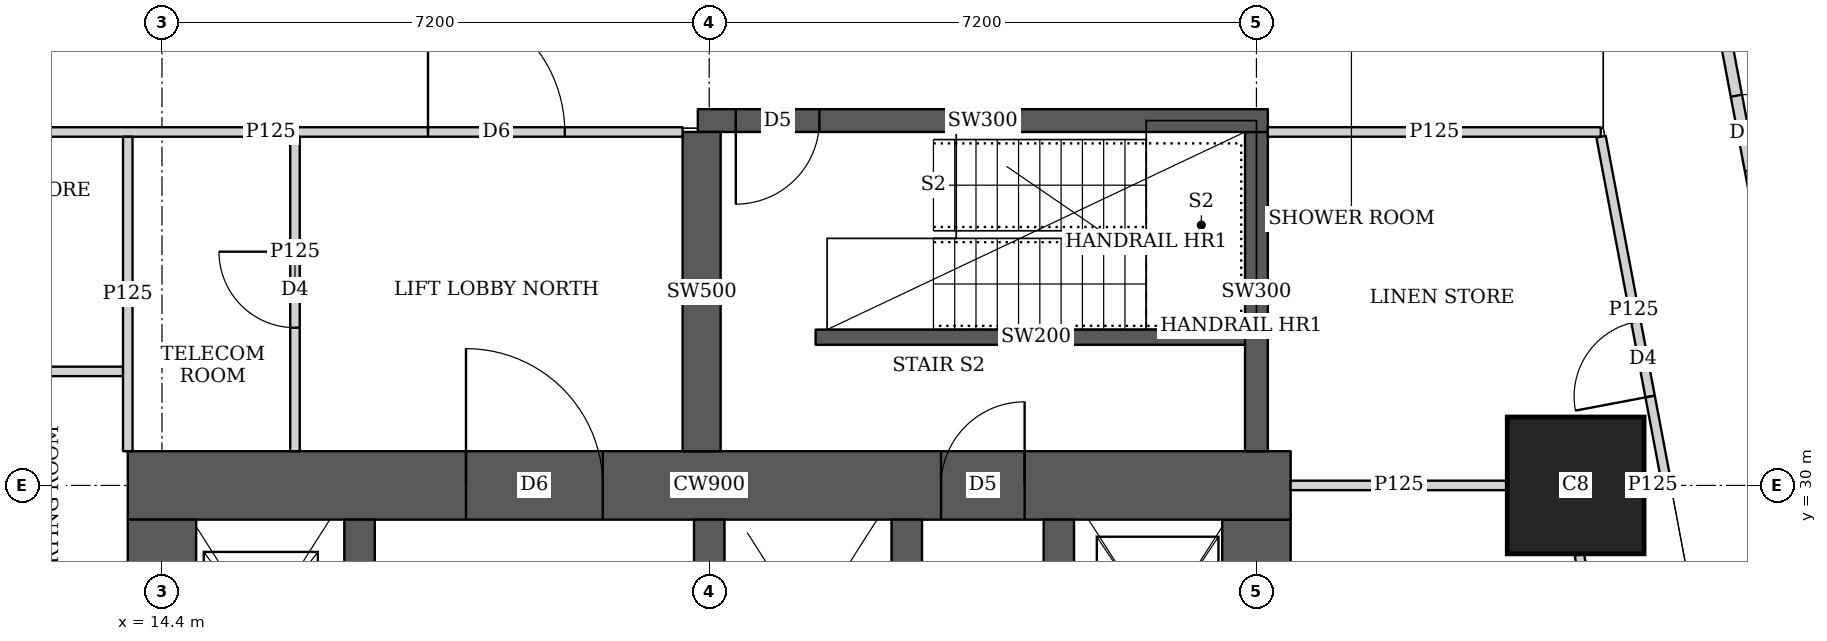
"""IFC4 building model, lengths in metres.
Left out: names, types, materials, properties, quantities, classifications, styles, units other than length and angle.
Written with IfcOpenShell. Run it as: python <this file> out.ifc"""

import sys

from ifc_helpers import new_model, si_unit, direction, frame, frame_2d, origin, origin_2d, place, context, subcontext, project, spatial, rectangle, extrude, element, fill, save


model = new_model("IFC4")
c1 = context("Model", 3, precision=1e-05, world=origin(), true_north=direction((0.0, 1.0)))
c2 = subcontext(c1, "Body", "Model", "MODEL_VIEW")
j1 = project(units=[si_unit("LENGTHUNIT", "METRE"), si_unit("PLANEANGLEUNIT", "RADIAN")], contexts=[c1])
p1 = place(None, origin())
s1 = spatial("IfcSite", under=j1, at=p1, CompositionType="ELEMENT")
p2 = place(p1, origin())
s2 = spatial("IfcBuilding", under=s1, at=p2, CompositionType="ELEMENT")
p3 = place(p2, frame((0.0, 0.0, 20.0)))
s3 = spatial("IfcBuildingStorey", under=s2, at=p3, CompositionType="ELEMENT", Elevation=20.0)
p4 = place(p3, frame((33.0, 30.0, 0.0), z_axis=(0.0, 0.0, 1.0), x_axis=(1.0, 0.0, 0.0)))
e1 = element("IfcColumn", 1, at=p4, inside=s3, PredefinedType="COLUMN", context=c2, shape_type="SweptSolid", body=[
    extrude(rectangle(XDim=1.8, YDim=1.8, at=origin_2d()), origin(), (0.0, 0.0, 1.0), 3.75),
])
p5 = place(p3, frame((13.95, 30.0, 0.0), z_axis=(0.0, 0.0, 1.0), x_axis=(1.0, 0.0, 0.0)))
e2 = element("IfcWall", 2, at=p5, inside=s3, PredefinedType="SHEAR", context=c2, shape_type="SweptSolid", body=[
    extrude(rectangle(XDim=15.3, YDim=0.9, at=frame_2d((7.65, 0.0))), origin(), (0.0, 0.0, 1.0), 3.75),
])
p6 = place(p5, frame((4.45, 0.0, 0.0)))
e3 = element("IfcOpeningElement", 3, at=p6, cuts=e2, PredefinedType="OPENING", context=c2, shape_type="SweptSolid", body=[
    extrude(rectangle(XDim=1.8, YDim=2.1, at=frame_2d((0.9, 1.05))), frame((0.0, 0.46, 0.0), z_axis=(0.0, -1.0, 0.0), x_axis=(1.0, 0.0, 0.0)), (0.0, 0.0, 1.0), 0.92),
])
p7 = place(p5, frame((10.7, 0.0, 0.0)))
e4 = element("IfcOpeningElement", 4, at=p7, cuts=e2, PredefinedType="OPENING", context=c2, shape_type="SweptSolid", body=[
    extrude(rectangle(XDim=1.1, YDim=2.1, at=frame_2d((0.55, 1.05))), frame((0.0, 0.46, 0.0), z_axis=(0.0, -1.0, 0.0), x_axis=(1.0, 0.0, 0.0)), (0.0, 0.0, 1.0), 0.92),
])
for number, where, z_axis, x_axis in (
    (5, (14.4, 15.45, 0.0), (0.0, 0.0, 1.0), (0.0, 1.0, 0.0)),
    (6, (28.8, 15.45, 0.0), (0.0, 0.0, 1.0), (0.0, 1.0, 0.0)),
):
    element("IfcWall", number, at=place(p3, frame(where, z_axis=z_axis, x_axis=x_axis)), inside=s3, PredefinedType="SHEAR", context=c2, shape_type="SweptSolid", body=[
        extrude(rectangle(XDim=14.1, YDim=0.9, at=frame_2d((7.05, 0.0))), origin(), (0.0, 0.0, 1.0), 3.75),
    ])
p8 = place(p3, frame((17.0, 15.45, 0.0), z_axis=(0.0, 0.0, 1.0), x_axis=(0.0, 1.0, 0.0)))
e7 = element("IfcWall", 7, at=p8, inside=s3, PredefinedType="SHEAR", context=c2, shape_type="SweptSolid", body=[
    extrude(rectangle(XDim=14.1, YDim=0.4, at=frame_2d((7.05, 0.0))), origin(), (0.0, 0.0, 1.0), 3.75),
])
p9 = place(p8, frame((0.875, 0.0, 0.0)))
e8 = element("IfcOpeningElement", 8, at=p9, cuts=e7, PredefinedType="OPENING", context=c2, shape_type="SweptSolid", body=[
    extrude(rectangle(XDim=1.1, YDim=2.1, at=frame_2d((0.55, 1.05))), frame((0.0, 0.21, 0.0), z_axis=(0.0, -1.0, 0.0), x_axis=(1.0, 0.0, 0.0)), (0.0, 0.0, 1.0), 0.42),
])
p10 = place(p8, frame((4.625, 0.0, 0.0)))
e9 = element("IfcOpeningElement", 9, at=p10, cuts=e7, PredefinedType="OPENING", context=c2, shape_type="SweptSolid", body=[
    extrude(rectangle(XDim=1.1, YDim=2.1, at=frame_2d((0.55, 1.05))), frame((0.0, 0.21, 0.0), z_axis=(0.0, -1.0, 0.0), x_axis=(1.0, 0.0, 0.0)), (0.0, 0.0, 1.0), 0.42),
])
p11 = place(p8, frame((8.375, 0.0, 0.0)))
e10 = element("IfcOpeningElement", 10, at=p11, cuts=e7, PredefinedType="OPENING", context=c2, shape_type="SweptSolid", body=[
    extrude(rectangle(XDim=1.1, YDim=2.1, at=frame_2d((0.55, 1.05))), frame((0.0, 0.21, 0.0), z_axis=(0.0, -1.0, 0.0), x_axis=(1.0, 0.0, 0.0)), (0.0, 0.0, 1.0), 0.42),
])
p12 = place(p8, frame((12.125, 0.0, 0.0)))
e11 = element("IfcOpeningElement", 11, at=p12, cuts=e7, PredefinedType="OPENING", context=c2, shape_type="SweptSolid", body=[
    extrude(rectangle(XDim=1.1, YDim=2.1, at=frame_2d((0.55, 1.05))), frame((0.0, 0.21, 0.0), z_axis=(0.0, -1.0, 0.0), x_axis=(1.0, 0.0, 0.0)), (0.0, 0.0, 1.0), 0.42),
])
for number, where, z_axis, x_axis in (
    (12, (21.6, 15.45, 0.0), (0.0, 0.0, 1.0), (0.0, 1.0, 0.0)),
    (13, (24.2, 15.45, 0.0), (0.0, 0.0, 1.0), (0.0, 1.0, 0.0)),
):
    element("IfcWall", number, at=place(p3, frame(where, z_axis=z_axis, x_axis=x_axis)), inside=s3, PredefinedType="SHEAR", context=c2, shape_type="SweptSolid", body=[
        extrude(rectangle(XDim=14.1, YDim=0.4, at=frame_2d((7.05, 0.0))), origin(), (0.0, 0.0, 1.0), 3.75),
    ])
p13 = place(p3, frame((26.2, 26.45, 0.0), z_axis=(0.0, 0.0, 1.0), x_axis=(0.0, 1.0, 0.0)))
e14 = element("IfcWall", 14, at=p13, inside=s3, PredefinedType="SHEAR", context=c2, shape_type="SweptSolid", body=[
    extrude(rectangle(XDim=3.1, YDim=0.4, at=frame_2d((1.55, 0.0))), origin(), (0.0, 0.0, 1.0), 3.75),
])
p14 = place(p13, frame((1.075, 0.0, 0.0)))
e15 = element("IfcOpeningElement", 15, at=p14, cuts=e14, PredefinedType="OPENING", context=c2, shape_type="SweptSolid", body=[
    extrude(rectangle(XDim=1.2, YDim=2.1, at=frame_2d((0.6, 1.05))), frame((0.0, 0.21, 0.0), z_axis=(0.0, -1.0, 0.0), x_axis=(1.0, 0.0, 0.0)), (0.0, 0.0, 1.0), 0.42),
])
p15 = place(p3, frame((21.45, 34.8, 0.0), z_axis=(0.0, 0.0, 1.0), x_axis=(1.0, 0.0, 0.0)))
e16 = element("IfcWall", 16, at=p15, inside=s3, PredefinedType="SHEAR", context=c2, shape_type="SweptSolid", body=[
    extrude(rectangle(XDim=7.5, YDim=0.3, at=frame_2d((3.75, 0.0))), origin(), (0.0, 0.0, 1.0), 3.75),
])
p16 = place(p15, frame((0.5, 0.0, 0.0)))
e17 = element("IfcOpeningElement", 17, at=p16, cuts=e16, PredefinedType="OPENING", context=c2, shape_type="SweptSolid", body=[
    extrude(rectangle(XDim=1.1, YDim=2.1, at=frame_2d((0.55, 1.05))), frame((0.0, 0.16, 0.0), z_axis=(0.0, -1.0, 0.0), x_axis=(1.0, 0.0, 0.0)), (0.0, 0.0, 1.0), 0.32),
])
p17 = place(p3, frame((21.5, 30.45, 0.0), z_axis=(0.0, 0.0, 1.0), x_axis=(0.0, 1.0, 0.0)))
e18 = element("IfcWall", 18, at=p17, inside=s3, PredefinedType="SHEAR", context=c2, shape_type="SweptSolid", body=[
    extrude(rectangle(XDim=4.2, YDim=0.5, at=frame_2d((2.1, 0.0))), origin(), (0.0, 0.0, 1.0), 3.75),
])
p18 = place(p3, frame((28.8, 30.45, 0.0), z_axis=(0.0, 0.0, 1.0), x_axis=(0.0, 1.0, 0.0)))
e19 = element("IfcWall", 19, at=p18, inside=s3, PredefinedType="SHEAR", context=c2, shape_type="SweptSolid", body=[
    extrude(rectangle(XDim=4.2, YDim=0.3, at=frame_2d((2.1, 0.0))), origin(), (0.0, 0.0, 1.0), 3.75),
])
p19 = place(p3, frame((33.755, 42.325, 0.0), z_axis=(0.0, 0.0, 1.0), x_axis=(0.185611461091, -0.982623216453, 0.0)))
e20 = element("IfcWall", 20, at=p19, inside=s3, PredefinedType="SOLIDWALL", context=c2, shape_type="SweptSolid", body=[
    extrude(rectangle(XDim=40.241, YDim=0.15, at=frame_2d((20.121, 0.0))), origin(), (0.0, 0.0, 1.0), 2.5),
])
p20 = place(p19, frame((7.325, 0.0, 0.0)))
e21 = element("IfcOpeningElement", 21, at=p20, cuts=e20, PredefinedType="OPENING", context=c2, shape_type="SweptSolid", body=[
    extrude(rectangle(XDim=1.0, YDim=2.1, at=frame_2d((0.5, 1.05))), frame((0.0, 0.085, 0.0), z_axis=(0.0, -1.0, 0.0), x_axis=(1.0, 0.0, 0.0)), (0.0, 0.0, 1.0), 0.17),
])
p21 = place(p19, frame((11.902, 0.0, 0.0)))
e22 = element("IfcOpeningElement", 22, at=p21, cuts=e20, PredefinedType="OPENING", context=c2, shape_type="SweptSolid", body=[
    extrude(rectangle(XDim=1.0, YDim=2.1, at=frame_2d((0.5, 1.05))), frame((0.0, 0.085, 0.0), z_axis=(0.0, -1.0, 0.0), x_axis=(1.0, 0.0, 0.0)), (0.0, 0.0, 1.0), 0.17),
])
p22 = place(p19, frame((25.718, 0.0, 0.0)))
e23 = element("IfcOpeningElement", 23, at=p22, cuts=e20, PredefinedType="OPENING", context=c2, shape_type="SweptSolid", body=[
    extrude(rectangle(XDim=1.0, YDim=2.1, at=frame_2d((0.5, 1.05))), frame((0.0, 0.085, 0.0), z_axis=(0.0, -1.0, 0.0), x_axis=(1.0, 0.0, 0.0)), (0.0, 0.0, 1.0), 0.17),
])
p23 = place(p19, frame((31.788, 0.0, 0.0)))
e24 = element("IfcOpeningElement", 24, at=p23, cuts=e20, PredefinedType="OPENING", context=c2, shape_type="SweptSolid", body=[
    extrude(rectangle(XDim=1.0, YDim=2.1, at=frame_2d((0.5, 1.05))), frame((0.0, 0.085, 0.0), z_axis=(0.0, -1.0, 0.0), x_axis=(1.0, 0.0, 0.0)), (0.0, 0.0, 1.0), 0.17),
])
p24 = place(p3, frame((10.413, 31.5, 0.0), z_axis=(0.0, 0.0, 1.0), x_axis=(1.0, 0.0, 0.0)))
e25 = element("IfcWall", 25, at=p24, inside=s3, PredefinedType="PARTITIONING", context=c2, shape_type="SweptSolid", body=[
    extrude(rectangle(XDim=3.475, YDim=0.125, at=frame_2d((1.737, 0.0))), origin(), (0.0, 0.0, 1.0), 3.5),
])
p25 = place(p3, frame((13.95, 30.45, 0.0), z_axis=(0.0, 0.0, 1.0), x_axis=(0.0, 1.0, 0.0)))
e26 = element("IfcWall", 26, at=p25, inside=s3, PredefinedType="PARTITIONING", context=c2, shape_type="SweptSolid", body=[
    extrude(rectangle(XDim=4.137, YDim=0.125, at=frame_2d((2.068, 0.0))), origin(), (0.0, 0.0, 1.0), 3.5),
])
p26 = place(p3, frame((10.413, 34.65, 0.0), z_axis=(0.0, 0.0, 1.0), x_axis=(1.0, 0.0, 0.0)))
e27 = element("IfcWall", 27, at=p26, inside=s3, PredefinedType="PARTITIONING", context=c2, shape_type="SweptSolid", body=[
    extrude(rectangle(XDim=10.837, YDim=0.125, at=frame_2d((5.418, 0.0))), origin(), (0.0, 0.0, 1.0), 3.5),
])
p27 = place(p26, frame((7.487, 0.0, 0.0)))
e28 = element("IfcOpeningElement", 28, at=p27, cuts=e27, PredefinedType="OPENING", context=c2, shape_type="SweptSolid", body=[
    extrude(rectangle(XDim=1.8, YDim=2.1, at=frame_2d((0.9, 1.05))), frame((0.0, 0.073, 0.0), z_axis=(0.0, -1.0, 0.0), x_axis=(1.0, 0.0, 0.0)), (0.0, 0.0, 1.0), 0.145),
])
p28 = place(p3, frame((16.15, 30.45, 0.0), z_axis=(0.0, 0.0, 1.0), x_axis=(0.0, 1.0, 0.0)))
e29 = element("IfcWall", 29, at=p28, inside=s3, PredefinedType="PARTITIONING", context=c2, shape_type="SweptSolid", body=[
    extrude(rectangle(XDim=4.137, YDim=0.125, at=frame_2d((2.068, 0.0))), origin(), (0.0, 0.0, 1.0), 3.5),
])
p29 = place(p28, frame((1.625, 0.0, 0.0)))
e30 = element("IfcOpeningElement", 30, at=p29, cuts=e29, PredefinedType="OPENING", context=c2, shape_type="SweptSolid", body=[
    extrude(rectangle(XDim=1.0, YDim=2.1, at=frame_2d((0.5, 1.05))), frame((0.0, 0.073, 0.0), z_axis=(0.0, -1.0, 0.0), x_axis=(1.0, 0.0, 0.0)), (0.0, 0.0, 1.0), 0.145),
])
p30 = place(p3, frame((28.95, 34.65, 0.0), z_axis=(0.0, 0.0, 1.0), x_axis=(1.0, 0.0, 0.0)))
e31 = element("IfcWall", 31, at=p30, inside=s3, PredefinedType="PARTITIONING", context=c2, shape_type="SweptSolid", body=[
    extrude(rectangle(XDim=4.381, YDim=0.125, at=frame_2d((2.19, 0.0))), origin(), (0.0, 0.0, 1.0), 3.5),
])
p31 = place(p3, frame((34.193, 30.04, 0.0), z_axis=(0.0, 0.0, 1.0), x_axis=(-0.185626015863, 0.982620467034, 0.0)))
e32 = element("IfcWall", 32, at=p31, inside=s3, PredefinedType="PARTITIONING", context=c2, shape_type="SweptSolid", body=[
    extrude(rectangle(XDim=4.628, YDim=0.125, at=frame_2d((2.314, 0.0))), origin(), (0.0, 0.0, 1.0), 2.5),
])
p32 = place(p31, frame((1.15, 0.0, 0.0)))
e33 = element("IfcOpeningElement", 33, at=p32, cuts=e32, PredefinedType="OPENING", context=c2, shape_type="SweptSolid", body=[
    extrude(rectangle(XDim=1.0, YDim=2.1, at=frame_2d((0.5, 1.05))), frame((0.0, 0.073, 0.0), z_axis=(0.0, -1.0, 0.0), x_axis=(1.0, 0.0, 0.0)), (0.0, 0.0, 1.0), 0.145),
])
p33 = place(p3, frame((34.28, 22.574, 0.0), z_axis=(0.0, 0.0, 1.0), x_axis=(-0.185713862218, 0.982603867986, 0.0)))
e34 = element("IfcWall", 34, at=p33, inside=s3, PredefinedType="PARTITIONING", context=c2, shape_type="SweptSolid", body=[
    extrude(rectangle(XDim=6.628, YDim=0.125, at=frame_2d((3.314, 0.0))), origin(), (0.0, 0.0, 1.0), 2.5),
])
p34 = place(p33, frame((3.241, 0.0, 0.0)))
e35 = element("IfcOpeningElement", 35, at=p34, cuts=e34, PredefinedType="OPENING", context=c2, shape_type="SweptSolid", body=[
    extrude(rectangle(XDim=1.0, YDim=2.1, at=frame_2d((0.5, 1.05))), frame((0.0, 0.073, 0.0), z_axis=(0.0, -1.0, 0.0), x_axis=(1.0, 0.0, 0.0)), (0.0, 0.0, 1.0), 0.145),
])
p35 = place(p3, frame((29.25, 30.0, 0.0), z_axis=(0.0, 0.0, 1.0), x_axis=(1.0, 0.0, 0.0)))
e36 = element("IfcWall", 36, at=p35, inside=s3, PredefinedType="PARTITIONING", context=c2, shape_type="SweptSolid", body=[
    extrude(rectangle(XDim=2.849, YDim=0.125, at=frame_2d((1.425, 0.0))), origin(), (0.0, 0.0, 1.0), 3.5),
])
p36 = place(p3, frame((33.901, 30.0, 0.0), z_axis=(0.0, 0.0, 1.0), x_axis=(1.0, 0.0, 0.0)))
e37 = element("IfcWall", 37, at=p36, inside=s3, PredefinedType="PARTITIONING", context=c2, shape_type="SweptSolid", body=[
    extrude(rectangle(XDim=0.224, YDim=0.125, at=frame_2d((0.112, 0.0))), origin(), (0.0, 0.0, 1.0), 2.5),
])
p37 = place(p3, frame((23.0, 31.95, 0.0), z_axis=(0.0, 0.0, 1.0), x_axis=(1.0, 0.0, 0.0)))
e38 = element("IfcWall", 38, at=p37, inside=s3, PredefinedType="SHEAR", context=c2, shape_type="SweptSolid", body=[
    extrude(rectangle(XDim=5.8, YDim=0.2, at=frame_2d((2.9, 0.0))), origin(), (0.0, 0.0, 1.0), 3.75),
])
p38 = place(p20, origin())
e39 = element("IfcDoor", 39, at=p38, inside=s3, OperationType="SINGLE_SWING_RIGHT", PredefinedType="DOOR", context=c2, shape_type="SweptSolid", body=[
    extrude(rectangle(XDim=1.0, YDim=2.1, at=frame_2d((0.5, 1.05))), frame((0.0, 0.025, 0.0), z_axis=(0.0, -1.0, 0.0), x_axis=(1.0, 0.0, 0.0)), (0.0, 0.0, 1.0), 0.05),
])
fill(e21, e39)
p39 = place(p29, origin())
e40 = element("IfcDoor", 40, at=p39, inside=s3, OperationType="SINGLE_SWING_RIGHT", PredefinedType="DOOR", context=c2, shape_type="SweptSolid", body=[
    extrude(rectangle(XDim=1.0, YDim=2.1, at=frame_2d((0.5, 1.05))), frame((0.0, 0.025, 0.0), z_axis=(0.0, -1.0, 0.0), x_axis=(1.0, 0.0, 0.0)), (0.0, 0.0, 1.0), 0.05),
])
fill(e30, e40)
p40 = place(p27, origin())
e41 = element("IfcDoor", 41, at=p40, inside=s3, OperationType="DOUBLE_DOOR_SINGLE_SWING", PredefinedType="DOOR", context=c2, shape_type="SweptSolid", body=[
    extrude(rectangle(XDim=1.8, YDim=2.1, at=frame_2d((0.9, 1.05))), frame((0.0, 0.025, 0.0), z_axis=(0.0, -1.0, 0.0), x_axis=(1.0, 0.0, 0.0)), (0.0, 0.0, 1.0), 0.05),
])
fill(e28, e41)
p41 = place(p32, origin())
e42 = element("IfcDoor", 42, at=p41, inside=s3, OperationType="SINGLE_SWING_LEFT", PredefinedType="DOOR", context=c2, shape_type="SweptSolid", body=[
    extrude(rectangle(XDim=1.0, YDim=2.1, at=frame_2d((0.5, 1.05))), frame((0.0, 0.025, 0.0), z_axis=(0.0, -1.0, 0.0), x_axis=(1.0, 0.0, 0.0)), (0.0, 0.0, 1.0), 0.05),
])
fill(e33, e42)
p42 = place(p6, origin())
e43 = element("IfcDoor", 43, at=p42, inside=s3, OperationType="DOUBLE_DOOR_SINGLE_SWING", PredefinedType="DOOR", context=c2, shape_type="SweptSolid", body=[
    extrude(rectangle(XDim=1.8, YDim=2.1, at=frame_2d((0.9, 1.05))), frame((0.0, 0.025, 0.0), z_axis=(0.0, -1.0, 0.0), x_axis=(1.0, 0.0, 0.0)), (0.0, 0.0, 1.0), 0.05),
])
fill(e3, e43)
p43 = place(p7, origin())
e44 = element("IfcDoor", 44, at=p43, inside=s3, OperationType="SINGLE_SWING_RIGHT", PredefinedType="DOOR", context=c2, shape_type="SweptSolid", body=[
    extrude(rectangle(XDim=1.1, YDim=2.1, at=frame_2d((0.55, 1.05))), frame((0.0, 0.025, 0.0), z_axis=(0.0, -1.0, 0.0), x_axis=(1.0, 0.0, 0.0)), (0.0, 0.0, 1.0), 0.05),
])
fill(e4, e44)
p44 = place(p16, origin())
e45 = element("IfcDoor", 45, at=p44, inside=s3, OperationType="SINGLE_SWING_RIGHT", PredefinedType="DOOR", context=c2, shape_type="SweptSolid", body=[
    extrude(rectangle(XDim=1.1, YDim=2.1, at=frame_2d((0.55, 1.05))), frame((0.0, 0.025, 0.0), z_axis=(0.0, -1.0, 0.0), x_axis=(1.0, 0.0, 0.0)), (0.0, 0.0, 1.0), 0.05),
])
fill(e17, e45)
save(model, sys.argv[1])
